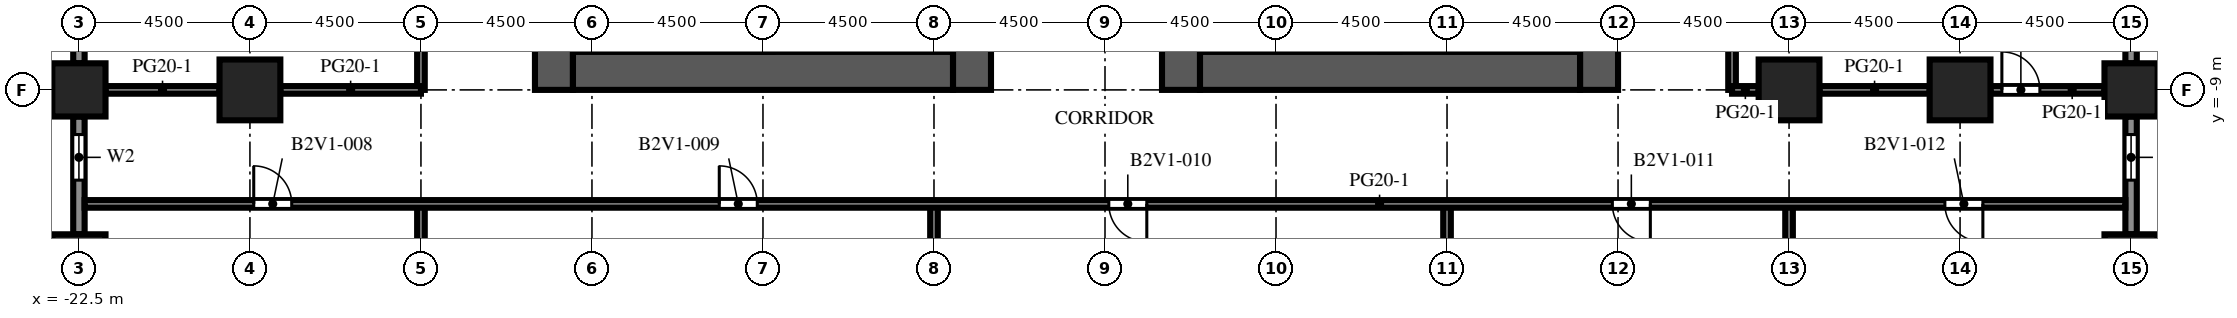
"""IFC4 building model, lengths in metres.
Left out: names, types, materials, properties, quantities, classifications, styles, units other than length and angle.
Written with IfcOpenShell. Run it as: python <this file> out.ifc"""

import sys

from ifc_helpers import new_model, si_unit, direction, frame, frame_2d, origin, origin_2d, place, context, subcontext, project, spatial, rectangle, extrude, element, fill, save


model = new_model("IFC4")
c1 = context("Model", 3, precision=1e-05, world=origin(), true_north=direction((0.0, 1.0)))
c2 = subcontext(c1, "Body", "Model", "MODEL_VIEW")
j1 = project(units=[si_unit("LENGTHUNIT", "METRE"), si_unit("PLANEANGLEUNIT", "RADIAN")], contexts=[c1])
p1 = place(None, origin())
s1 = spatial("IfcSite", under=j1, at=p1, CompositionType="ELEMENT")
p2 = place(p1, origin())
s2 = spatial("IfcBuilding", under=s1, at=p2, CompositionType="ELEMENT")
p3 = place(p2, frame((0.0, 0.0, 50.1)))
s3 = spatial("IfcBuildingStorey", under=s2, at=p3, CompositionType="ELEMENT", Elevation=50.1)
for number, where, z_axis, x_axis in (
    (1, (-22.5, -13.5, 0.0), (0.0, 0.0, 1.0), (1.0, 0.0, 0.0)),
    (2, (-22.5, -9.0, 0.0), (0.0, 0.0, 1.0), (1.0, 0.0, 0.0)),
    (3, (31.5, -13.5, 0.0), (0.0, 0.0, 1.0), (1.0, 0.0, 0.0)),
    (4, (31.5, -9.0, 0.0), (0.0, 0.0, 1.0), (1.0, 0.0, 0.0)),
):
    element("IfcColumn", number, at=place(p3, frame(where, z_axis=z_axis, x_axis=x_axis)), inside=s3, PredefinedType="COLUMN", context=c2, shape_type="SweptSolid", body=[
        extrude(rectangle(XDim=1.4, YDim=1.4, at=origin_2d()), origin(), (0.0, 0.0, 1.0), 4.1),
    ])
for number, where, z_axis, x_axis in (
    (5, (-18.0, -9.0, 0.0), (0.0, 0.0, 1.0), (1.0, 0.0, 0.0)),
    (6, (22.5, -9.0, 0.0), (0.0, 0.0, 1.0), (1.0, 0.0, 0.0)),
    (7, (27.0, -9.0, 0.0), (0.0, 0.0, 1.0), (1.0, 0.0, 0.0)),
):
    element("IfcColumn", number, at=place(p3, frame(where, z_axis=z_axis, x_axis=x_axis)), inside=s3, PredefinedType="COLUMN", context=c2, shape_type="SweptSolid", body=[
        extrude(rectangle(XDim=1.6, YDim=1.6, at=origin_2d()), origin(), (0.0, 0.0, 1.0), 4.1),
    ])
p4 = place(p3, frame((-10.0, -9.0, 0.0), z_axis=(0.0, 0.0, 1.0), x_axis=(0.0, 1.0, 0.0)))
e8 = element("IfcWall", 8, at=p4, inside=s3, PredefinedType="SHEAR", context=c2, shape_type="SweptSolid", body=[
    extrude(rectangle(XDim=27.5, YDim=1.0, at=frame_2d((13.75, 0.0))), origin(), (0.0, 0.0, 1.0), 4.1),
])
p5 = place(p4, frame((12.55, 0.0, 0.0)))
e9 = element("IfcOpeningElement", 9, at=p5, cuts=e8, PredefinedType="OPENING", context=c2, shape_type="SweptSolid", body=[
    extrude(rectangle(XDim=2.4, YDim=2.4, at=frame_2d((1.2, 1.2))), frame((0.0, 0.51, 0.0), z_axis=(0.0, -1.0, 0.0), x_axis=(1.0, 0.0, 0.0)), (0.0, 0.0, 1.0), 1.02),
])
p6 = place(p4, frame((6.825, 0.0, 0.0)))
e10 = element("IfcOpeningElement", 10, at=p6, cuts=e8, PredefinedType="OPENING", context=c2, shape_type="SweptSolid", body=[
    extrude(rectangle(XDim=1.2, YDim=2.1, at=frame_2d((0.6, 1.05))), frame((0.0, 0.51, 0.0), z_axis=(0.0, -1.0, 0.0), x_axis=(1.0, 0.0, 0.0)), (0.0, 0.0, 1.0), 1.02),
])
p7 = place(p4, frame((19.475, 0.0, 0.0)))
e11 = element("IfcOpeningElement", 11, at=p7, cuts=e8, PredefinedType="OPENING", context=c2, shape_type="SweptSolid", body=[
    extrude(rectangle(XDim=1.2, YDim=2.1, at=frame_2d((0.6, 1.05))), frame((0.0, 0.51, 0.0), z_axis=(0.0, -1.0, 0.0), x_axis=(1.0, 0.0, 0.0)), (0.0, 0.0, 1.0), 1.02),
])
p8 = place(p3, frame((1.0, -9.0, 0.0), z_axis=(0.0, 0.0, 1.0), x_axis=(0.0, 1.0, 0.0)))
e12 = element("IfcWall", 12, at=p8, inside=s3, PredefinedType="SHEAR", context=c2, shape_type="SweptSolid", body=[
    extrude(rectangle(XDim=27.5, YDim=1.0, at=frame_2d((13.75, 0.0))), origin(), (0.0, 0.0, 1.0), 4.1),
])
p9 = place(p8, frame((12.55, 0.0, 0.0)))
e13 = element("IfcOpeningElement", 13, at=p9, cuts=e12, PredefinedType="OPENING", context=c2, shape_type="SweptSolid", body=[
    extrude(rectangle(XDim=2.4, YDim=2.4, at=frame_2d((1.2, 1.2))), frame((0.0, 0.51, 0.0), z_axis=(0.0, -1.0, 0.0), x_axis=(1.0, 0.0, 0.0)), (0.0, 0.0, 1.0), 1.02),
])
p10 = place(p8, frame((4.025, 0.0, 0.0)))
e14 = element("IfcOpeningElement", 14, at=p10, cuts=e12, PredefinedType="OPENING", context=c2, shape_type="SweptSolid", body=[
    extrude(rectangle(XDim=1.2, YDim=2.1, at=frame_2d((0.6, 1.05))), frame((0.0, 0.51, 0.0), z_axis=(0.0, -1.0, 0.0), x_axis=(1.0, 0.0, 0.0)), (0.0, 0.0, 1.0), 1.02),
])
p11 = place(p8, frame((22.275, 0.0, 0.0)))
e15 = element("IfcOpeningElement", 15, at=p11, cuts=e12, PredefinedType="OPENING", context=c2, shape_type="SweptSolid", body=[
    extrude(rectangle(XDim=1.2, YDim=2.1, at=frame_2d((0.6, 1.05))), frame((0.0, 0.51, 0.0), z_axis=(0.0, -1.0, 0.0), x_axis=(1.0, 0.0, 0.0)), (0.0, 0.0, 1.0), 1.02),
])
p12 = place(p3, frame((-9.5, -8.5, 0.0), z_axis=(0.0, 0.0, 1.0), x_axis=(1.0, 0.0, 0.0)))
e16 = element("IfcWall", 16, at=p12, inside=s3, PredefinedType="SHEAR", context=c2, shape_type="SweptSolid", body=[
    extrude(rectangle(XDim=10.0, YDim=1.0, at=frame_2d((5.0, 0.0))), origin(), (0.0, 0.0, 1.0), 4.1),
])
p13 = place(p3, frame((6.5, -9.0, 0.0), z_axis=(0.0, 0.0, 1.0), x_axis=(0.0, 1.0, 0.0)))
e17 = element("IfcWall", 17, at=p13, inside=s3, PredefinedType="SHEAR", context=c2, shape_type="SweptSolid", body=[
    extrude(rectangle(XDim=27.5, YDim=1.0, at=frame_2d((13.75, 0.0))), origin(), (0.0, 0.0, 1.0), 4.1),
])
p14 = place(p13, frame((12.55, 0.0, 0.0)))
e18 = element("IfcOpeningElement", 18, at=p14, cuts=e17, PredefinedType="OPENING", context=c2, shape_type="SweptSolid", body=[
    extrude(rectangle(XDim=2.4, YDim=2.4, at=frame_2d((1.2, 1.2))), frame((0.0, 0.51, 0.0), z_axis=(0.0, -1.0, 0.0), x_axis=(1.0, 0.0, 0.0)), (0.0, 0.0, 1.0), 1.02),
])
p15 = place(p13, frame((4.025, 0.0, 0.0)))
e19 = element("IfcOpeningElement", 19, at=p15, cuts=e17, PredefinedType="OPENING", context=c2, shape_type="SweptSolid", body=[
    extrude(rectangle(XDim=1.2, YDim=2.1, at=frame_2d((0.6, 1.05))), frame((0.0, 0.51, 0.0), z_axis=(0.0, -1.0, 0.0), x_axis=(1.0, 0.0, 0.0)), (0.0, 0.0, 1.0), 1.02),
])
p16 = place(p13, frame((22.275, 0.0, 0.0)))
e20 = element("IfcOpeningElement", 20, at=p16, cuts=e17, PredefinedType="OPENING", context=c2, shape_type="SweptSolid", body=[
    extrude(rectangle(XDim=1.2, YDim=2.1, at=frame_2d((0.6, 1.05))), frame((0.0, 0.51, 0.0), z_axis=(0.0, -1.0, 0.0), x_axis=(1.0, 0.0, 0.0)), (0.0, 0.0, 1.0), 1.02),
])
p17 = place(p3, frame((17.5, -9.0, 0.0), z_axis=(0.0, 0.0, 1.0), x_axis=(0.0, 1.0, 0.0)))
e21 = element("IfcWall", 21, at=p17, inside=s3, PredefinedType="SHEAR", context=c2, shape_type="SweptSolid", body=[
    extrude(rectangle(XDim=27.5, YDim=1.0, at=frame_2d((13.75, 0.0))), origin(), (0.0, 0.0, 1.0), 4.1),
])
p18 = place(p17, frame((12.55, 0.0, 0.0)))
e22 = element("IfcOpeningElement", 22, at=p18, cuts=e21, PredefinedType="OPENING", context=c2, shape_type="SweptSolid", body=[
    extrude(rectangle(XDim=2.4, YDim=2.4, at=frame_2d((1.2, 1.2))), frame((0.0, 0.51, 0.0), z_axis=(0.0, -1.0, 0.0), x_axis=(1.0, 0.0, 0.0)), (0.0, 0.0, 1.0), 1.02),
])
p19 = place(p17, frame((6.825, 0.0, 0.0)))
e23 = element("IfcOpeningElement", 23, at=p19, cuts=e21, PredefinedType="OPENING", context=c2, shape_type="SweptSolid", body=[
    extrude(rectangle(XDim=1.2, YDim=2.1, at=frame_2d((0.6, 1.05))), frame((0.0, 0.51, 0.0), z_axis=(0.0, -1.0, 0.0), x_axis=(1.0, 0.0, 0.0)), (0.0, 0.0, 1.0), 1.02),
])
p20 = place(p17, frame((19.475, 0.0, 0.0)))
e24 = element("IfcOpeningElement", 24, at=p20, cuts=e21, PredefinedType="OPENING", context=c2, shape_type="SweptSolid", body=[
    extrude(rectangle(XDim=1.2, YDim=2.1, at=frame_2d((0.6, 1.05))), frame((0.0, 0.51, 0.0), z_axis=(0.0, -1.0, 0.0), x_axis=(1.0, 0.0, 0.0)), (0.0, 0.0, 1.0), 1.02),
])
p21 = place(p3, frame((7.0, -8.5, 0.0), z_axis=(0.0, 0.0, 1.0), x_axis=(1.0, 0.0, 0.0)))
e25 = element("IfcWall", 25, at=p21, inside=s3, PredefinedType="SHEAR", context=c2, shape_type="SweptSolid", body=[
    extrude(rectangle(XDim=10.0, YDim=1.0, at=frame_2d((5.0, 0.0))), origin(), (0.0, 0.0, 1.0), 4.1),
])
p22 = place(p3, frame((31.5, -9.7, 0.0), z_axis=(0.0, 0.0, 1.0), x_axis=(0.0, -1.0, 0.0)))
e26 = element("IfcWall", 26, at=p22, inside=s3, PredefinedType="SOLIDWALL", context=c2, shape_type="SweptSolid", body=[
    extrude(rectangle(XDim=3.1, YDim=0.3, at=frame_2d((1.55, 0.0))), origin(), (0.0, 0.0, 1.0), 2.75),
])
p23 = place(p22, frame((0.475, 0.0, 0.8)))
e27 = element("IfcOpeningElement", 27, at=p23, cuts=e26, PredefinedType="OPENING", context=c2, shape_type="SweptSolid", body=[
    extrude(rectangle(XDim=1.2, YDim=1.7, at=frame_2d((0.6, 0.85))), frame((0.0, 0.16, 0.0), z_axis=(0.0, -1.0, 0.0), x_axis=(1.0, 0.0, 0.0)), (0.0, 0.0, 1.0), 0.32),
])
p24 = place(p3, frame((31.5, -5.2, 0.0), z_axis=(0.0, 0.0, 1.0), x_axis=(0.0, -1.0, 0.0)))
e28 = element("IfcWall", 28, at=p24, inside=s3, PredefinedType="SOLIDWALL", context=c2, shape_type="SweptSolid", body=[
    extrude(rectangle(XDim=3.1, YDim=0.3, at=frame_2d((1.55, 0.0))), origin(), (0.0, 0.0, 1.0), 2.75),
])
p25 = place(p24, frame((0.35, 0.0, 0.8)))
e29 = element("IfcOpeningElement", 29, at=p25, cuts=e28, PredefinedType="OPENING", context=c2, shape_type="SweptSolid", body=[
    extrude(rectangle(XDim=2.4, YDim=1.7, at=frame_2d((1.2, 0.85))), frame((0.0, 0.16, 0.0), z_axis=(0.0, -1.0, 0.0), x_axis=(1.0, 0.0, 0.0)), (0.0, 0.0, 1.0), 0.32),
])
p26 = place(p3, frame((-22.5, -8.3, 0.0), z_axis=(0.0, 0.0, 1.0), x_axis=(0.0, 1.0, 0.0)))
e30 = element("IfcWall", 30, at=p26, inside=s3, PredefinedType="SOLIDWALL", context=c2, shape_type="SweptSolid", body=[
    extrude(rectangle(XDim=3.1, YDim=0.3, at=frame_2d((1.55, 0.0))), origin(), (0.0, 0.0, 1.0), 2.75),
])
p27 = place(p26, frame((0.35, 0.0, 0.8)))
e31 = element("IfcOpeningElement", 31, at=p27, cuts=e30, PredefinedType="OPENING", context=c2, shape_type="SweptSolid", body=[
    extrude(rectangle(XDim=2.4, YDim=1.7, at=frame_2d((1.2, 0.85))), frame((0.0, 0.16, 0.0), z_axis=(0.0, -1.0, 0.0), x_axis=(1.0, 0.0, 0.0)), (0.0, 0.0, 1.0), 0.32),
])
p28 = place(p3, frame((-22.5, -12.8, 0.0), z_axis=(0.0, 0.0, 1.0), x_axis=(0.0, 1.0, 0.0)))
e32 = element("IfcWall", 32, at=p28, inside=s3, PredefinedType="SOLIDWALL", context=c2, shape_type="SweptSolid", body=[
    extrude(rectangle(XDim=3.1, YDim=0.3, at=frame_2d((1.55, 0.0))), origin(), (0.0, 0.0, 1.0), 2.75),
])
p29 = place(p28, frame((1.425, 0.0, 0.8)))
e33 = element("IfcOpeningElement", 33, at=p29, cuts=e32, PredefinedType="OPENING", context=c2, shape_type="SweptSolid", body=[
    extrude(rectangle(XDim=1.2, YDim=1.7, at=frame_2d((0.6, 0.85))), frame((0.0, 0.16, 0.0), z_axis=(0.0, -1.0, 0.0), x_axis=(1.0, 0.0, 0.0)), (0.0, 0.0, 1.0), 0.32),
])
p30 = place(p3, frame((-1.0, -8.0, 0.0), z_axis=(0.0, 0.0, 1.0), x_axis=(0.0, 1.0, 0.0)))
e34 = element("IfcWall", 34, at=p30, inside=s3, PredefinedType="PARTITIONING", context=c2, shape_type="SweptSolid", body=[
    extrude(rectangle(XDim=2.175, YDim=0.1, at=frame_2d((1.087, 0.0))), origin(), (0.0, 0.0, 1.0), 3.65),
])
p31 = place(p30, frame((0.587, 0.0, 0.0)))
e35 = element("IfcOpeningElement", 35, at=p31, cuts=e34, PredefinedType="OPENING", context=c2, shape_type="SweptSolid", body=[
    extrude(rectangle(XDim=1.0, YDim=2.1, at=frame_2d((0.5, 1.05))), frame((0.0, 0.06, 0.0), z_axis=(0.0, -1.0, 0.0), x_axis=(1.0, 0.0, 0.0)), (0.0, 0.0, 1.0), 0.12),
])
p32 = place(p3, frame((8.5, -8.0, 0.0), z_axis=(0.0, 0.0, 1.0), x_axis=(0.0, 1.0, 0.0)))
e36 = element("IfcWall", 36, at=p32, inside=s3, PredefinedType="PARTITIONING", context=c2, shape_type="SweptSolid", body=[
    extrude(rectangle(XDim=2.175, YDim=0.1, at=frame_2d((1.087, 0.0))), origin(), (0.0, 0.0, 1.0), 3.65),
])
p33 = place(p32, frame((0.587, 0.0, 0.0)))
e37 = element("IfcOpeningElement", 37, at=p33, cuts=e36, PredefinedType="OPENING", context=c2, shape_type="SweptSolid", body=[
    extrude(rectangle(XDim=1.0, YDim=2.1, at=frame_2d((0.5, 1.05))), frame((0.0, 0.06, 0.0), z_axis=(0.0, -1.0, 0.0), x_axis=(1.0, 0.0, 0.0)), (0.0, 0.0, 1.0), 0.12),
])
p34 = place(p3, frame((-13.5, -26.3, 0.0), z_axis=(0.0, 0.0, 1.0), x_axis=(0.0, 1.0, 0.0)))
e38 = element("IfcWall", 38, at=p34, inside=s3, PredefinedType="PARTITIONING", context=c2, shape_type="SweptSolid", body=[
    extrude(rectangle(XDim=14.3, YDim=0.2, at=frame_2d((7.15, 0.0))), origin(), (0.0, 0.0, 1.0), 3.65),
])
p35 = place(p3, frame((-13.5, -9.0, 0.0), z_axis=(0.0, 0.0, 1.0), x_axis=(0.0, 1.0, 0.0)))
e39 = element("IfcWall", 39, at=p35, inside=s3, PredefinedType="PARTITIONING", context=c2, shape_type="SweptSolid", body=[
    extrude(rectangle(XDim=27.5, YDim=0.2, at=frame_2d((13.75, 0.0))), origin(), (0.0, 0.0, 1.0), 3.65),
])
p36 = place(p35, frame((5.1, 0.0, 0.0)))
e40 = element("IfcOpeningElement", 40, at=p36, cuts=e39, PredefinedType="OPENING", context=c2, shape_type="SweptSolid", body=[
    extrude(rectangle(XDim=1.0, YDim=2.1, at=frame_2d((0.5, 1.05))), frame((0.0, 0.11, 0.0), z_axis=(0.0, -1.0, 0.0), x_axis=(1.0, 0.0, 0.0)), (0.0, 0.0, 1.0), 0.22),
])
p37 = place(p35, frame((15.6, 0.0, 0.0)))
e41 = element("IfcOpeningElement", 41, at=p37, cuts=e39, PredefinedType="OPENING", context=c2, shape_type="SweptSolid", body=[
    extrude(rectangle(XDim=1.0, YDim=2.1, at=frame_2d((0.5, 1.05))), frame((0.0, 0.11, 0.0), z_axis=(0.0, -1.0, 0.0), x_axis=(1.0, 0.0, 0.0)), (0.0, 0.0, 1.0), 0.22),
])
p38 = place(p3, frame((0.0, -17.2, 0.0), z_axis=(0.0, 0.0, 1.0), x_axis=(0.0, 1.0, 0.0)))
e42 = element("IfcWall", 42, at=p38, inside=s3, PredefinedType="PARTITIONING", context=c2, shape_type="SweptSolid", body=[
    extrude(rectangle(XDim=5.2, YDim=0.2, at=frame_2d((2.6, 0.0))), origin(), (0.0, 0.0, 1.0), 3.65),
])
p39 = place(p3, frame((13.5, -26.3, 0.0), z_axis=(0.0, 0.0, 1.0), x_axis=(0.0, 1.0, 0.0)))
e43 = element("IfcWall", 43, at=p39, inside=s3, PredefinedType="PARTITIONING", context=c2, shape_type="SweptSolid", body=[
    extrude(rectangle(XDim=14.3, YDim=0.2, at=frame_2d((7.15, 0.0))), origin(), (0.0, 0.0, 1.0), 3.65),
])
p40 = place(p3, frame((21.0, 18.5, 0.0), z_axis=(0.0, 0.0, 1.0), x_axis=(0.0, -1.0, 0.0)))
e44 = element("IfcWall", 44, at=p40, inside=s3, PredefinedType="PARTITIONING", context=c2, shape_type="SweptSolid", body=[
    extrude(rectangle(XDim=27.5, YDim=0.2, at=frame_2d((13.75, 0.0))), origin(), (0.0, 0.0, 1.0), 3.65),
])
p41 = place(p40, frame((10.9, 0.0, 0.0)))
e45 = element("IfcOpeningElement", 45, at=p41, cuts=e44, PredefinedType="OPENING", context=c2, shape_type="SweptSolid", body=[
    extrude(rectangle(XDim=1.0, YDim=2.1, at=frame_2d((0.5, 1.05))), frame((0.0, 0.11, 0.0), z_axis=(0.0, -1.0, 0.0), x_axis=(1.0, 0.0, 0.0)), (0.0, 0.0, 1.0), 0.22),
])
p42 = place(p3, frame((22.5, -17.2, 0.0), z_axis=(0.0, 0.0, 1.0), x_axis=(0.0, 1.0, 0.0)))
e46 = element("IfcWall", 46, at=p42, inside=s3, PredefinedType="PARTITIONING", context=c2, shape_type="SweptSolid", body=[
    extrude(rectangle(XDim=5.2, YDim=0.2, at=frame_2d((2.6, 0.0))), origin(), (0.0, 0.0, 1.0), 3.65),
])
p43 = place(p3, frame((31.35, -12.0, 0.0), z_axis=(0.0, 0.0, 1.0), x_axis=(-1.0, 0.0, 0.0)))
e47 = element("IfcWall", 47, at=p43, inside=s3, PredefinedType="PARTITIONING", context=c2, shape_type="SweptSolid", body=[
    extrude(rectangle(XDim=53.7, YDim=0.2, at=frame_2d((26.85, 0.0))), origin(), (0.0, 0.0, 1.0), 3.65),
])
p44 = place(p43, frame((48.25, 0.0, 0.0)))
e48 = element("IfcOpeningElement", 48, at=p44, cuts=e47, PredefinedType="OPENING", context=c2, shape_type="SweptSolid", body=[
    extrude(rectangle(XDim=1.0, YDim=2.1, at=frame_2d((0.5, 1.05))), frame((0.0, 0.11, 0.0), z_axis=(0.0, -1.0, 0.0), x_axis=(1.0, 0.0, 0.0)), (0.0, 0.0, 1.0), 0.22),
])
p45 = place(p43, frame((36.0, 0.0, 0.0)))
e49 = element("IfcOpeningElement", 49, at=p45, cuts=e47, PredefinedType="OPENING", context=c2, shape_type="SweptSolid", body=[
    extrude(rectangle(XDim=1.0, YDim=2.1, at=frame_2d((0.5, 1.05))), frame((0.0, 0.11, 0.0), z_axis=(0.0, -1.0, 0.0), x_axis=(1.0, 0.0, 0.0)), (0.0, 0.0, 1.0), 0.22),
])
p46 = place(p43, frame((25.75, 0.0, 0.0)))
e50 = element("IfcOpeningElement", 50, at=p46, cuts=e47, PredefinedType="OPENING", context=c2, shape_type="SweptSolid", body=[
    extrude(rectangle(XDim=1.0, YDim=2.1, at=frame_2d((0.5, 1.05))), frame((0.0, 0.11, 0.0), z_axis=(0.0, -1.0, 0.0), x_axis=(1.0, 0.0, 0.0)), (0.0, 0.0, 1.0), 0.22),
])
p47 = place(p43, frame((12.5, 0.0, 0.0)))
e51 = element("IfcOpeningElement", 51, at=p47, cuts=e47, PredefinedType="OPENING", context=c2, shape_type="SweptSolid", body=[
    extrude(rectangle(XDim=1.0, YDim=2.1, at=frame_2d((0.5, 1.05))), frame((0.0, 0.11, 0.0), z_axis=(0.0, -1.0, 0.0), x_axis=(1.0, 0.0, 0.0)), (0.0, 0.0, 1.0), 0.22),
])
p48 = place(p43, frame((3.75, 0.0, 0.0)))
e52 = element("IfcOpeningElement", 52, at=p48, cuts=e47, PredefinedType="OPENING", context=c2, shape_type="SweptSolid", body=[
    extrude(rectangle(XDim=1.0, YDim=2.1, at=frame_2d((0.5, 1.05))), frame((0.0, 0.11, 0.0), z_axis=(0.0, -1.0, 0.0), x_axis=(1.0, 0.0, 0.0)), (0.0, 0.0, 1.0), 0.22),
])
p49 = place(p3, frame((-21.8, -9.0, 0.0), z_axis=(0.0, 0.0, 1.0), x_axis=(1.0, 0.0, 0.0)))
e53 = element("IfcWall", 53, at=p49, inside=s3, PredefinedType="PARTITIONING", context=c2, shape_type="SweptSolid", body=[
    extrude(rectangle(XDim=3.0, YDim=0.2, at=frame_2d((1.5, 0.0))), origin(), (0.0, 0.0, 1.0), 3.65),
])
p50 = place(p3, frame((-17.2, -9.0, 0.0), z_axis=(0.0, 0.0, 1.0), x_axis=(1.0, 0.0, 0.0)))
e54 = element("IfcWall", 54, at=p50, inside=s3, PredefinedType="PARTITIONING", context=c2, shape_type="SweptSolid", body=[
    extrude(rectangle(XDim=3.7, YDim=0.2, at=frame_2d((1.85, 0.0))), origin(), (0.0, 0.0, 1.0), 3.65),
])
p51 = place(p3, frame((21.0, -9.0, 0.0), z_axis=(0.0, 0.0, 1.0), x_axis=(1.0, 0.0, 0.0)))
e55 = element("IfcWall", 55, at=p51, inside=s3, PredefinedType="PARTITIONING", context=c2, shape_type="SweptSolid", body=[
    extrude(rectangle(XDim=0.7, YDim=0.2, at=frame_2d((0.35, 0.0))), origin(), (0.0, 0.0, 1.0), 3.65),
])
p52 = place(p3, frame((23.3, -9.0, 0.0), z_axis=(0.0, 0.0, 1.0), x_axis=(1.0, 0.0, 0.0)))
e56 = element("IfcWall", 56, at=p52, inside=s3, PredefinedType="PARTITIONING", context=c2, shape_type="SweptSolid", body=[
    extrude(rectangle(XDim=2.9, YDim=0.2, at=frame_2d((1.45, 0.0))), origin(), (0.0, 0.0, 1.0), 3.65),
])
p53 = place(p3, frame((27.8, -9.0, 0.0), z_axis=(0.0, 0.0, 1.0), x_axis=(1.0, 0.0, 0.0)))
e57 = element("IfcWall", 57, at=p53, inside=s3, PredefinedType="PARTITIONING", context=c2, shape_type="SweptSolid", body=[
    extrude(rectangle(XDim=3.0, YDim=0.2, at=frame_2d((1.5, 0.0))), origin(), (0.0, 0.0, 1.0), 3.65),
])
p54 = place(p53, frame((0.3, 0.0, 0.0)))
e58 = element("IfcOpeningElement", 58, at=p54, cuts=e57, PredefinedType="OPENING", context=c2, shape_type="SweptSolid", body=[
    extrude(rectangle(XDim=1.0, YDim=2.1, at=frame_2d((0.5, 1.05))), frame((0.0, 0.11, 0.0), z_axis=(0.0, -1.0, 0.0), x_axis=(1.0, 0.0, 0.0)), (0.0, 0.0, 1.0), 0.22),
])
p55 = place(p23, origin())
e59 = element("IfcWindow", 59, at=p55, inside=s3, PartitioningType="SINGLE_PANEL", PredefinedType="WINDOW", context=c2, shape_type="SweptSolid", body=[
    extrude(rectangle(XDim=1.2, YDim=1.7, at=frame_2d((0.6, 0.85))), frame((0.0, 0.03, 0.0), z_axis=(0.0, -1.0, 0.0), x_axis=(1.0, 0.0, 0.0)), (0.0, 0.0, 1.0), 0.06),
])
fill(e27, e59)
p56 = place(p29, origin())
e60 = element("IfcWindow", 60, at=p56, inside=s3, PartitioningType="SINGLE_PANEL", PredefinedType="WINDOW", context=c2, shape_type="SweptSolid", body=[
    extrude(rectangle(XDim=1.2, YDim=1.7, at=frame_2d((0.6, 0.85))), frame((0.0, 0.03, 0.0), z_axis=(0.0, -1.0, 0.0), x_axis=(1.0, 0.0, 0.0)), (0.0, 0.0, 1.0), 0.06),
])
fill(e33, e60)
p57 = place(p44, origin())
e61 = element("IfcDoor", 61, at=p57, inside=s3, OperationType="SINGLE_SWING_RIGHT", PredefinedType="DOOR", context=c2, shape_type="SweptSolid", body=[
    extrude(rectangle(XDim=1.0, YDim=2.1, at=frame_2d((0.5, 1.05))), frame((0.0, 0.025, 0.0), z_axis=(0.0, -1.0, 0.0), x_axis=(1.0, 0.0, 0.0)), (0.0, 0.0, 1.0), 0.05),
])
fill(e48, e61)
p58 = place(p45, origin())
e62 = element("IfcDoor", 62, at=p58, inside=s3, OperationType="SINGLE_SWING_RIGHT", PredefinedType="DOOR", context=c2, shape_type="SweptSolid", body=[
    extrude(rectangle(XDim=1.0, YDim=2.1, at=frame_2d((0.5, 1.05))), frame((0.0, 0.025, 0.0), z_axis=(0.0, -1.0, 0.0), x_axis=(1.0, 0.0, 0.0)), (0.0, 0.0, 1.0), 0.05),
])
fill(e49, e62)
p59 = place(p46, origin())
e63 = element("IfcDoor", 63, at=p59, inside=s3, OperationType="SINGLE_SWING_LEFT", PredefinedType="DOOR", context=c2, shape_type="SweptSolid", body=[
    extrude(rectangle(XDim=1.0, YDim=2.1, at=frame_2d((0.5, 1.05))), frame((0.0, 0.025, 0.0), z_axis=(0.0, -1.0, 0.0), x_axis=(1.0, 0.0, 0.0)), (0.0, 0.0, 1.0), 0.05),
])
fill(e50, e63)
p60 = place(p47, origin())
e64 = element("IfcDoor", 64, at=p60, inside=s3, OperationType="SINGLE_SWING_LEFT", PredefinedType="DOOR", context=c2, shape_type="SweptSolid", body=[
    extrude(rectangle(XDim=1.0, YDim=2.1, at=frame_2d((0.5, 1.05))), frame((0.0, 0.025, 0.0), z_axis=(0.0, -1.0, 0.0), x_axis=(1.0, 0.0, 0.0)), (0.0, 0.0, 1.0), 0.05),
])
fill(e51, e64)
p61 = place(p48, origin())
e65 = element("IfcDoor", 65, at=p61, inside=s3, OperationType="SINGLE_SWING_LEFT", PredefinedType="DOOR", context=c2, shape_type="SweptSolid", body=[
    extrude(rectangle(XDim=1.0, YDim=2.1, at=frame_2d((0.5, 1.05))), frame((0.0, 0.025, 0.0), z_axis=(0.0, -1.0, 0.0), x_axis=(1.0, 0.0, 0.0)), (0.0, 0.0, 1.0), 0.05),
])
fill(e52, e65)
p62 = place(p54, origin())
e66 = element("IfcDoor", 66, at=p62, inside=s3, OperationType="SINGLE_SWING_LEFT", PredefinedType="DOOR", context=c2, shape_type="SweptSolid", body=[
    extrude(rectangle(XDim=1.0, YDim=2.1, at=frame_2d((0.5, 1.05))), frame((0.0, 0.025, 0.0), z_axis=(0.0, -1.0, 0.0), x_axis=(1.0, 0.0, 0.0)), (0.0, 0.0, 1.0), 0.05),
])
fill(e58, e66)
save(model, sys.argv[1])
